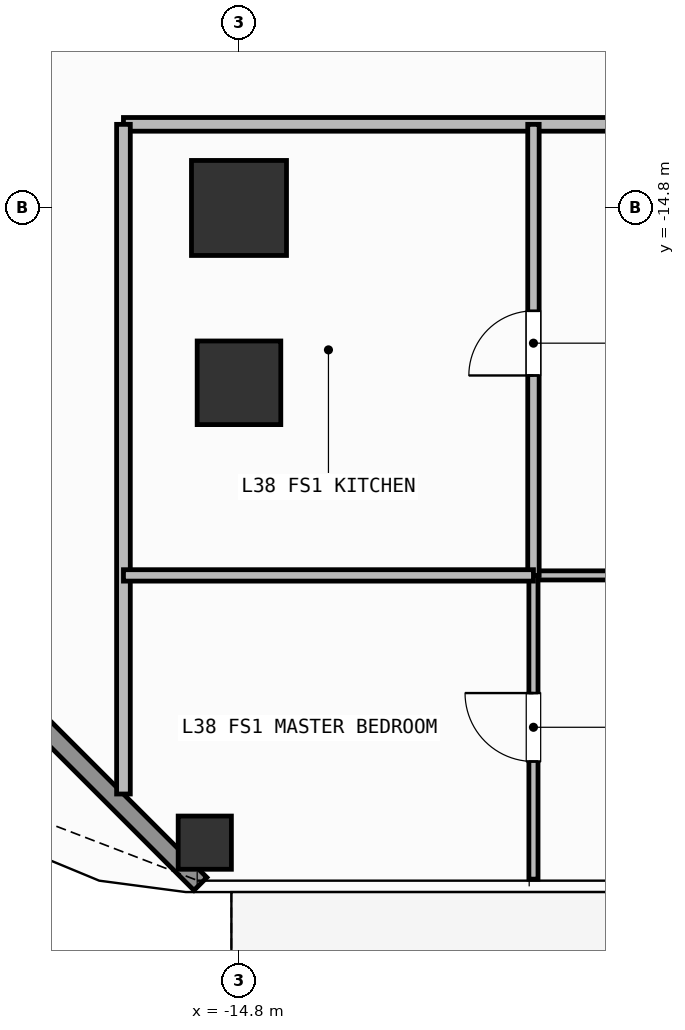
"""IFC4 building model, lengths in metres.
Left out: names, types, materials, properties, quantities, classifications, styles, units other than length and angle.
Written with IfcOpenShell. Run it as: python <this file> out.ifc"""

import sys

from ifc_helpers import new_model, si_unit, direction, frame, frame_2d, origin, origin_2d, place, context, subcontext, project, spatial, rectangle, hollow_rectangle, extrude, element, fill, save


model = new_model("IFC4")
c1 = context("Model", 3, precision=1e-05, world=origin(), true_north=direction((0.0, 1.0)))
c2 = subcontext(c1, "Body", "Model", "MODEL_VIEW")
j1 = project(units=[si_unit("LENGTHUNIT", "METRE"), si_unit("PLANEANGLEUNIT", "RADIAN")], contexts=[c1])
p1 = place(None, origin())
s1 = spatial("IfcSite", under=j1, at=p1, CompositionType="ELEMENT")
p2 = place(p1, origin())
s2 = spatial("IfcBuilding", under=s1, at=p2, CompositionType="ELEMENT")
p3 = place(p2, frame((0.0, 0.0, 152.4)))
s3 = spatial("IfcBuildingStorey", under=s2, at=p3, CompositionType="ELEMENT", Elevation=152.4)
p4 = place(p3, frame((-14.8, -14.8, 0.0), z_axis=(0.0, 0.0, 1.0), x_axis=(1.0, 0.0, 0.0)))
e1 = element("IfcColumn", 1, at=p4, inside=s3, PredefinedType="COLUMN", context=c2, shape_type="SweptSolid", body=[
    extrude(rectangle(XDim=1.25, YDim=1.25, at=origin_2d()), origin(), (0.0, 0.0, 1.0), 3.9),
])
p5 = place(p3, frame((-14.8, -17.1, 0.0), z_axis=(0.0, 0.0, 1.0), x_axis=(1.0, 0.0, 0.0)))
e2 = element("IfcColumn", 2, at=p5, inside=s3, PredefinedType="COLUMN", context=c2, shape_type="SweptSolid", body=[
    extrude(rectangle(XDim=1.1, YDim=1.1, at=origin_2d()), origin(), (0.0, 0.0, 1.0), 3.9),
])
p6 = place(p3, frame((-15.25, -23.15, 0.0), z_axis=(0.0, 0.0, 1.0), x_axis=(1.0, 0.0, 0.0)))
e3 = element("IfcColumn", 3, at=p6, inside=s3, PredefinedType="COLUMN", context=c2, shape_type="SweptSolid", body=[
    extrude(hollow_rectangle(XDim=0.7, YDim=0.7, WallThickness=0.032, at=origin_2d()), origin(), (0.0, 0.0, 1.0), 3.9),
])
p7 = place(p3, frame((-15.308, -23.692, 0.0), z_axis=(0.0, 0.0, 1.0), x_axis=(-0.707106781187, 0.707106781187, 0.0)))
e4 = element("IfcWall", 4, at=p7, inside=s3, PredefinedType="SOLIDWALL", context=c2, shape_type="SweptSolid", body=[
    extrude(rectangle(XDim=6.343, YDim=0.24, at=frame_2d((3.171, 0.0))), origin(), (0.0, 0.0, 1.0), 3.6),
])
p8 = place(p3, frame((-16.32, -13.7, 0.0), z_axis=(0.0, 0.0, 1.0), x_axis=(1.0, 0.0, 0.0)))
e5 = element("IfcWall", 5, at=p8, inside=s3, PredefinedType="PARTITIONING", context=c2, shape_type="SweptSolid", body=[
    extrude(rectangle(XDim=22.646, YDim=0.18, at=frame_2d((11.323, 0.0))), origin(), (0.0, 0.0, 1.0), 3.6),
])
p9 = place(p8, frame((11.271, 0.0, 0.0)))
e6 = element("IfcOpeningElement", 6, at=p9, cuts=e5, PredefinedType="OPENING", context=c2, shape_type="SweptSolid", body=[
    extrude(rectangle(XDim=1.0, YDim=2.2, at=frame_2d((0.5, 1.1))), frame((0.0, 0.1, 0.0), z_axis=(0.0, -1.0, 0.0), x_axis=(1.0, 0.0, 0.0)), (0.0, 0.0, 1.0), 0.2),
])
p10 = place(p3, frame((-10.926, -19.634, 0.0), z_axis=(0.0, 0.0, 1.0), x_axis=(1.0, 0.0, 0.0)))
e7 = element("IfcWall", 7, at=p10, inside=s3, PredefinedType="PARTITIONING", context=c2, shape_type="SweptSolid", body=[
    extrude(rectangle(XDim=12.89, YDim=0.12, at=frame_2d((6.445, 0.0))), origin(), (0.0, 0.0, 1.0), 3.6),
])
p11 = place(p10, frame((5.905, 0.0, 0.0)))
e8 = element("IfcOpeningElement", 8, at=p11, cuts=e7, PredefinedType="OPENING", context=c2, shape_type="SweptSolid", body=[
    extrude(rectangle(XDim=0.9, YDim=2.1, at=frame_2d((0.45, 1.05))), frame((0.0, 0.07, 0.0), z_axis=(0.0, -1.0, 0.0), x_axis=(1.0, 0.0, 0.0)), (0.0, 0.0, 1.0), 0.14),
])
p12 = place(p3, frame((-10.926, -19.634, 0.0), z_axis=(0.0, 0.0, 1.0), x_axis=(0.0, 1.0, 0.0)))
e9 = element("IfcWall", 9, at=p12, inside=s3, PredefinedType="PARTITIONING", context=c2, shape_type="SweptSolid", body=[
    extrude(rectangle(XDim=5.934, YDim=0.15, at=frame_2d((2.967, 0.0))), origin(), (0.0, 0.0, 1.0), 3.29),
])
p13 = place(p12, frame((2.63, 0.0, 0.0)))
e10 = element("IfcOpeningElement", 10, at=p13, cuts=e9, PredefinedType="OPENING", context=c2, shape_type="SweptSolid", body=[
    extrude(rectangle(XDim=0.85, YDim=2.1, at=frame_2d((0.425, 1.05))), frame((0.0, 0.085, 0.0), z_axis=(0.0, -1.0, 0.0), x_axis=(1.0, 0.0, 0.0)), (0.0, 0.0, 1.0), 0.17),
])
p14 = place(p3, frame((-10.926, -23.63, 0.0), z_axis=(0.0, 0.0, 1.0), x_axis=(0.0, 1.0, 0.0)))
e11 = element("IfcWall", 11, at=p14, inside=s3, PredefinedType="PARTITIONING", context=c2, shape_type="SweptSolid", body=[
    extrude(rectangle(XDim=3.996, YDim=0.12, at=frame_2d((1.998, 0.0))), origin(), (0.0, 0.0, 1.0), 3.29),
])
p15 = place(p14, frame((1.548, 0.0, 0.0)))
e12 = element("IfcOpeningElement", 12, at=p15, cuts=e11, PredefinedType="OPENING", context=c2, shape_type="SweptSolid", body=[
    extrude(rectangle(XDim=0.9, YDim=2.1, at=frame_2d((0.45, 1.05))), frame((0.0, 0.07, 0.0), z_axis=(0.0, -1.0, 0.0), x_axis=(1.0, 0.0, 0.0)), (0.0, 0.0, 1.0), 0.14),
])
p16 = place(p3, frame((-16.32, -22.51, 0.0), z_axis=(0.0, 0.0, 1.0), x_axis=(0.0, 1.0, 0.0)))
e13 = element("IfcWall", 13, at=p16, inside=s3, PredefinedType="PARTITIONING", context=c2, shape_type="SweptSolid", body=[
    extrude(rectangle(XDim=8.81, YDim=0.18, at=frame_2d((4.405, 0.0))), origin(), (0.0, 0.0, 1.0), 3.6),
])
p17 = place(p3, frame((-16.32, -19.634, 0.0), z_axis=(0.0, 0.0, 1.0), x_axis=(1.0, 0.0, 0.0)))
e14 = element("IfcWall", 14, at=p17, inside=s3, PredefinedType="PARTITIONING", context=c2, shape_type="SweptSolid", body=[
    extrude(rectangle(XDim=5.394, YDim=0.15, at=frame_2d((2.697, 0.0))), origin(), (0.0, 0.0, 1.0), 3.6),
])
p18 = place(p13, origin())
e15 = element("IfcDoor", 15, at=p18, inside=s3, OperationType="SINGLE_SWING_LEFT", PredefinedType="DOOR", context=c2, shape_type="SweptSolid", body=[
    extrude(rectangle(XDim=0.85, YDim=2.1, at=frame_2d((0.425, 1.05))), frame((0.0, 0.025, 0.0), z_axis=(0.0, -1.0, 0.0), x_axis=(1.0, 0.0, 0.0)), (0.0, 0.0, 1.0), 0.05),
])
fill(e10, e15)
p19 = place(p15, origin())
e16 = element("IfcDoor", 16, at=p19, inside=s3, OperationType="SINGLE_SWING_RIGHT", PredefinedType="DOOR", context=c2, shape_type="SweptSolid", body=[
    extrude(rectangle(XDim=0.9, YDim=2.1, at=frame_2d((0.45, 1.05))), frame((0.0, 0.025, 0.0), z_axis=(0.0, -1.0, 0.0), x_axis=(1.0, 0.0, 0.0)), (0.0, 0.0, 1.0), 0.05),
])
fill(e12, e16)
save(model, sys.argv[1])
